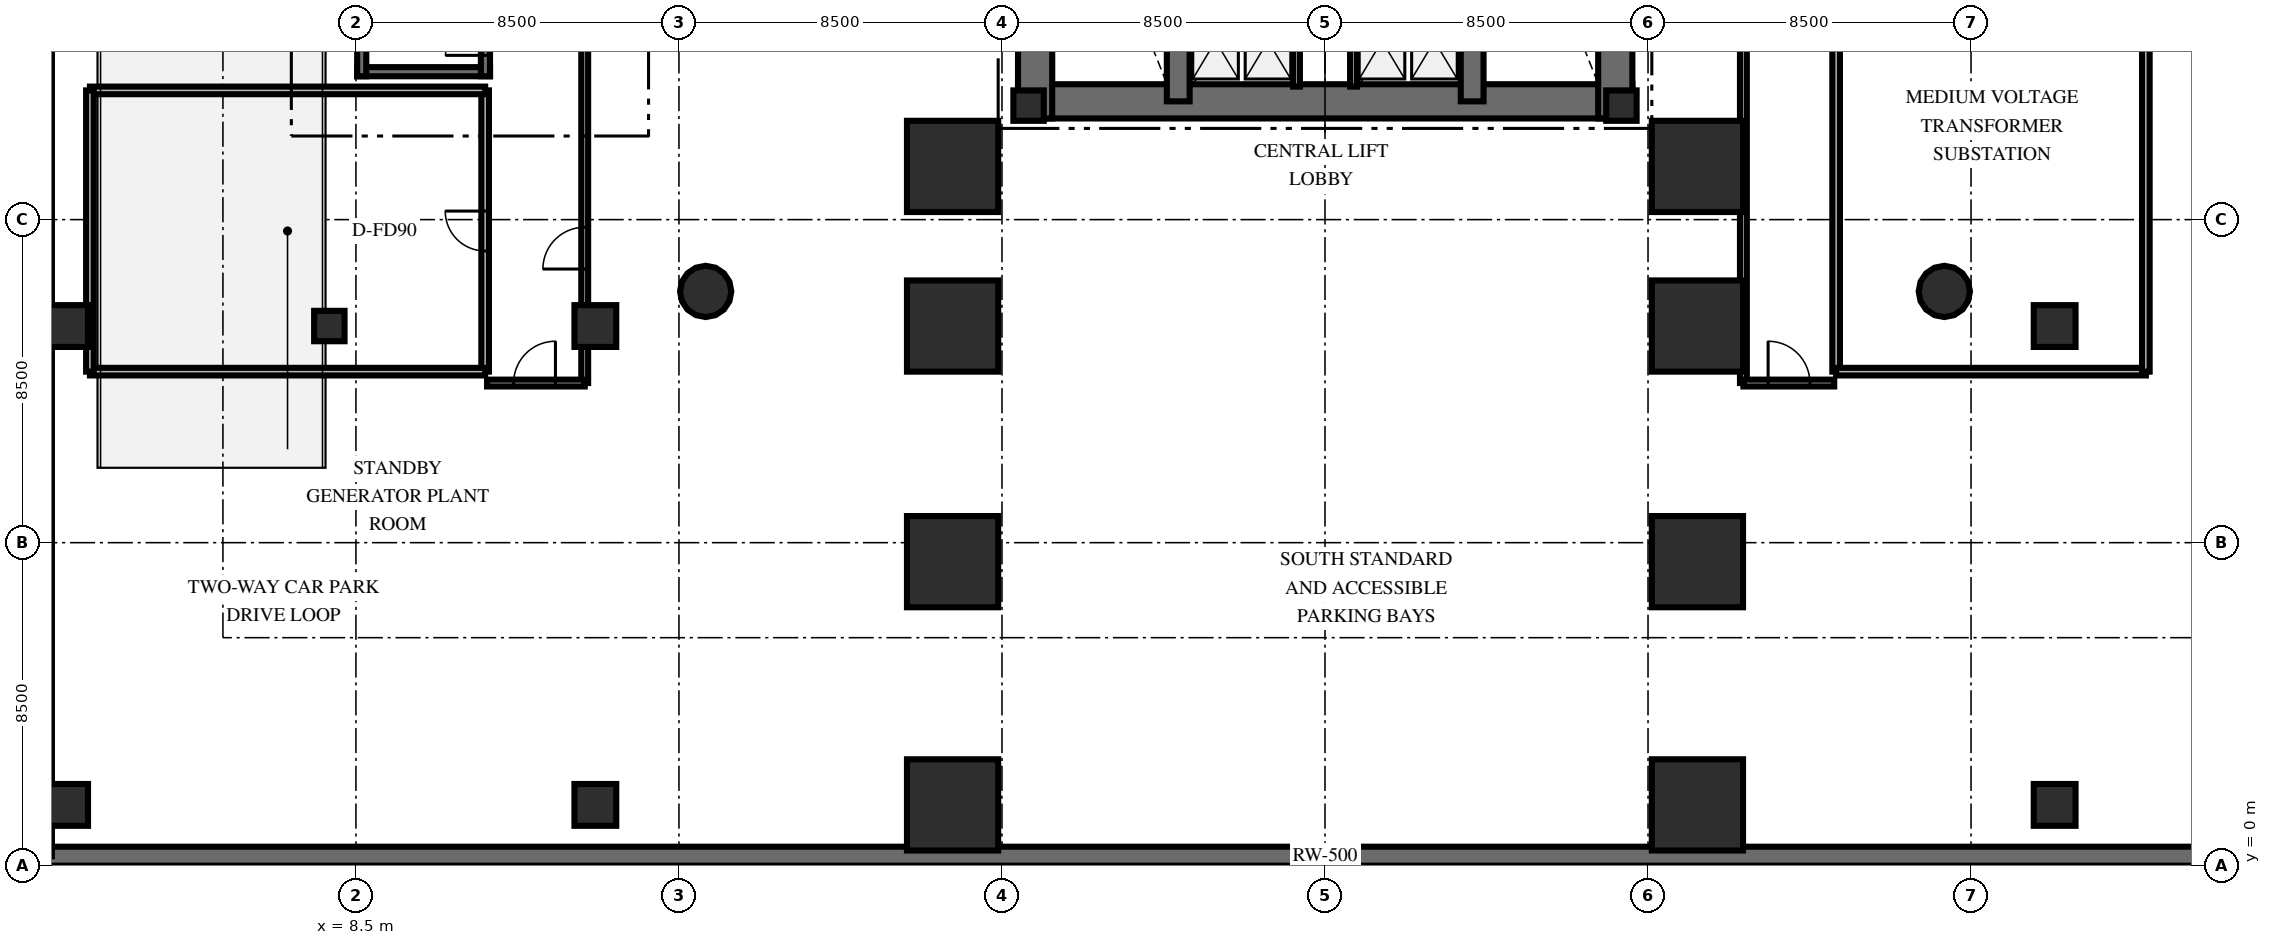
"""IFC4 building model, lengths in metres.
Left out: names, types, materials, properties, quantities, classifications, styles, units other than length and angle.
Written with IfcOpenShell. Run it as: python <this file> out.ifc"""

import sys

from ifc_helpers import new_model, si_unit, direction, frame, frame_2d, origin, origin_2d, place, context, subcontext, project, spatial, rectangle, circle, extrude, element, fill, save


model = new_model("IFC4")
c1 = context("Model", 3, precision=1e-05, world=origin(), true_north=direction((0.0, 1.0)))
c2 = subcontext(c1, "Body", "Model", "MODEL_VIEW")
j1 = project(units=[si_unit("LENGTHUNIT", "METRE"), si_unit("PLANEANGLEUNIT", "RADIAN")], contexts=[c1])
p1 = place(None, origin())
s1 = spatial("IfcSite", under=j1, at=p1, CompositionType="ELEMENT")
p2 = place(p1, origin())
s2 = spatial("IfcBuilding", under=s1, at=p2, CompositionType="ELEMENT")
p3 = place(p2, frame((0.0, 0.0, -4.8)))
s3 = spatial("IfcBuildingStorey", under=s2, at=p3, CompositionType="ELEMENT", Elevation=-4.8)
p4 = place(p3, frame((0.25, 0.25, 0.0), z_axis=(0.0, 0.0, 1.0), x_axis=(1.0, 0.0, 0.0)))
e1 = element("IfcWall", 1, at=p4, inside=s3, PredefinedType="SOLIDWALL", context=c2, shape_type="SweptSolid", body=[
    extrude(rectangle(XDim=67.5, YDim=0.5, at=frame_2d((33.75, 0.0))), origin(), (0.0, 0.0, 1.0), 4.8),
])
p5 = place(p3, frame((25.922, 20.112, 0.0), z_axis=(0.0, 0.0, 1.0), x_axis=(1.0, 0.0, 0.0)))
e2 = element("IfcWall", 2, at=p5, inside=s3, PredefinedType="SHEAR", context=c2, shape_type="SweptSolid", body=[
    extrude(rectangle(XDim=16.166, YDim=0.9, at=frame_2d((8.083, 0.0))), origin(), (0.0, 0.0, 1.0), 4.8),
])
for number, where, z_axis, x_axis in (
    (3, (26.372, 19.662, 0.0), (0.0, 0.0, 1.0), (0.0, 1.0, 0.0)),
    (4, (41.638, 19.662, 0.0), (0.0, 0.0, 1.0), (0.0, 1.0, 0.0)),
):
    element("IfcWall", number, at=place(p3, frame(where, z_axis=z_axis, x_axis=x_axis)), inside=s3, PredefinedType="SHEAR", context=c2, shape_type="SweptSolid", body=[
        extrude(rectangle(XDim=10.876, YDim=0.9, at=frame_2d((5.438, 0.0))), origin(), (0.0, 0.0, 1.0), 4.8),
    ])
for number, where, z_axis, x_axis in (
    (5, (30.138, 20.112, 0.0), (0.0, 0.0, 1.0), (0.0, 1.0, 0.0)),
    (6, (37.872, 20.112, 0.0), (0.0, 0.0, 1.0), (0.0, 1.0, 0.0)),
):
    element("IfcWall", number, at=place(p3, frame(where, z_axis=z_axis, x_axis=x_axis)), inside=s3, PredefinedType="SHEAR", context=c2, shape_type="SweptSolid", body=[
        extrude(rectangle(XDim=9.976, YDim=0.6, at=frame_2d((4.988, 0.0))), origin(), (0.0, 0.0, 1.0), 4.8),
    ])
for number, where, z_axis, x_axis in (
    (7, (26.2, 20.0, 0.0), (0.0, 0.0, 1.0), (1.0, 0.0, 0.0)),
    (8, (41.8, 20.0, 0.0), (0.0, 0.0, 1.0), (1.0, 0.0, 0.0)),
):
    element("IfcColumn", number, at=place(p3, frame(where, z_axis=z_axis, x_axis=x_axis)), inside=s3, PredefinedType="PILASTER", context=c2, shape_type="SweptSolid", body=[
        extrude(rectangle(XDim=0.8, YDim=0.8, at=origin_2d()), origin(), (0.0, 0.0, 1.0), 4.8),
    ])
p6 = place(p3, frame((8.532, 20.892, 0.0), z_axis=(0.0, 0.0, 1.0), x_axis=(1.0, 0.0, 0.0)))
e9 = element("IfcWall", 9, at=p6, inside=s3, PredefinedType="SHEAR", context=c2, shape_type="SweptSolid", body=[
    extrude(rectangle(XDim=3.496, YDim=0.24, at=frame_2d((1.748, 0.0))), origin(), (0.0, 0.0, 1.0), 4.8),
])
p7 = place(p3, frame((8.652, 20.772, 0.0), z_axis=(0.0, 0.0, 1.0), x_axis=(0.0, 1.0, 0.0)))
e10 = element("IfcWall", 10, at=p7, inside=s3, PredefinedType="SHEAR", context=c2, shape_type="SweptSolid", body=[
    extrude(rectangle(XDim=9.556, YDim=0.24, at=frame_2d((4.778, 0.0))), origin(), (0.0, 0.0, 1.0), 4.8),
])
p8 = place(p3, frame((11.908, 20.772, 0.0), z_axis=(0.0, 0.0, 1.0), x_axis=(0.0, 1.0, 0.0)))
e11 = element("IfcWall", 11, at=p8, inside=s3, PredefinedType="SHEAR", context=c2, shape_type="SweptSolid", body=[
    extrude(rectangle(XDim=9.556, YDim=0.24, at=frame_2d((4.778, 0.0))), origin(), (0.0, 0.0, 1.0), 4.8),
])
p9 = place(p8, frame((0.55, 0.0, 0.0)))
e12 = element("IfcOpeningElement", 12, at=p9, cuts=e11, PredefinedType="OPENING", context=c2, shape_type="SweptSolid", body=[
    extrude(rectangle(XDim=1.05, YDim=2.15, at=frame_2d((0.525, 1.075))), frame((0.0, 0.13, 0.0), z_axis=(0.0, -1.0, 0.0), x_axis=(1.0, 0.0, 0.0)), (0.0, 0.0, 1.0), 0.26),
])
for number, where, z_axis, x_axis in (
    (13, (24.2, 1.6, 0.0), (0.0, 0.0, 1.0), (1.0, 0.0, 0.0)),
    (14, (24.2, 8.0, 0.0), (0.0, 0.0, 1.0), (1.0, 0.0, 0.0)),
    (15, (24.2, 14.2, 0.0), (0.0, 0.0, 1.0), (1.0, 0.0, 0.0)),
    (16, (24.2, 18.4, 0.0), (0.0, 0.0, 1.0), (1.0, 0.0, 0.0)),
    (17, (43.8, 1.6, 0.0), (0.0, 0.0, 1.0), (1.0, 0.0, 0.0)),
    (18, (43.8, 8.0, 0.0), (0.0, 0.0, 1.0), (1.0, 0.0, 0.0)),
    (19, (43.8, 14.2, 0.0), (0.0, 0.0, 1.0), (1.0, 0.0, 0.0)),
    (20, (43.8, 18.4, 0.0), (0.0, 0.0, 1.0), (1.0, 0.0, 0.0)),
):
    element("IfcColumn", number, at=place(p3, frame(where, z_axis=z_axis, x_axis=x_axis)), inside=s3, PredefinedType="USERDEFINED", context=c2, shape_type="SweptSolid", body=[
        extrude(rectangle(XDim=2.4, YDim=2.4, at=origin_2d()), origin(), (0.0, 0.0, 1.0), 4.8),
    ])
for number, where, z_axis, x_axis in (
    (21, (0.9, 1.6, 0.0), (0.0, 0.0, 1.0), (1.0, 0.0, 0.0)),
    (22, (0.9, 14.2, 0.0), (0.0, 0.0, 1.0), (1.0, 0.0, 0.0)),
    (23, (14.8, 1.6, 0.0), (0.0, 0.0, 1.0), (1.0, 0.0, 0.0)),
    (24, (14.8, 14.2, 0.0), (0.0, 0.0, 1.0), (1.0, 0.0, 0.0)),
    (25, (53.2, 1.6, 0.0), (0.0, 0.0, 1.0), (1.0, 0.0, 0.0)),
    (26, (53.2, 14.2, 0.0), (0.0, 0.0, 1.0), (1.0, 0.0, 0.0)),
):
    element("IfcColumn", number, at=place(p3, frame(where, z_axis=z_axis, x_axis=x_axis)), inside=s3, PredefinedType="COLUMN", context=c2, shape_type="SweptSolid", body=[
        extrude(rectangle(XDim=1.1, YDim=1.1, at=origin_2d()), origin(), (0.0, 0.0, 1.0), 4.8),
    ])
for number, where, z_axis, x_axis in (
    (27, (17.703, 15.111, 0.0), (0.0, 0.0, 1.0), (1.0, 0.0, 0.0)),
    (28, (50.297, 15.111, 0.0), (0.0, 0.0, 1.0), (1.0, 0.0, 0.0)),
):
    element("IfcColumn", number, at=place(p3, frame(where, z_axis=z_axis, x_axis=x_axis)), inside=s3, PredefinedType="COLUMN", context=c2, shape_type="SweptSolid", body=[
        extrude(circle(Radius=0.675, at=origin_2d()), origin(), (0.0, 0.0, 1.0), 4.8),
    ])
p10 = place(p3, frame((7.8, 14.2, 0.0), z_axis=(0.0, 0.0, 1.0), x_axis=(1.0, 0.0, 0.0)))
e29 = element("IfcColumn", 29, at=p10, inside=s3, PredefinedType="COLUMN", context=c2, shape_type="SweptSolid", body=[
    extrude(rectangle(XDim=0.8, YDim=0.8, at=origin_2d()), origin(), (0.0, 0.0, 1.0), 4.8),
])
for number, where, z_axis, x_axis in (
    (30, (33.25, 20.5, 0.0), (0.0, 0.0, 1.0), (0.0, 1.0, 0.0)),
    (31, (34.75, 20.5, 0.0), (0.0, 0.0, 1.0), (0.0, 1.0, 0.0)),
):
    element("IfcWall", number, at=place(p3, frame(where, z_axis=z_axis, x_axis=x_axis)), inside=s3, PredefinedType="SOLIDWALL", context=c2, shape_type="SweptSolid", body=[
        extrude(rectangle(XDim=2.42, YDim=0.18, at=frame_2d((1.21, 0.0))), origin(), (0.0, 0.0, 1.0), 3.56),
    ])
p11 = place(p3, frame((14.52, 12.7, 0.0), z_axis=(0.0, 0.0, 1.0), x_axis=(0.0, 1.0, 0.0)))
e32 = element("IfcWall", 32, at=p11, inside=s3, PredefinedType="PARTITIONING", context=c2, shape_type="SweptSolid", body=[
    extrude(rectangle(XDim=21.73, YDim=0.18, at=frame_2d((10.865, 0.0))), origin(), (0.0, 0.0, 1.0), 3.56),
])
p12 = place(p11, frame((3.0, 0.0, 0.0)))
e33 = element("IfcOpeningElement", 33, at=p12, cuts=e32, PredefinedType="OPENING", context=c2, shape_type="SweptSolid", body=[
    extrude(rectangle(XDim=1.1, YDim=2.15, at=frame_2d((0.55, 1.075))), frame((0.0, 0.1, 0.0), z_axis=(0.0, -1.0, 0.0), x_axis=(1.0, 0.0, 0.0)), (0.0, 0.0, 1.0), 0.2),
])
p13 = place(p3, frame((11.95, 12.7, 0.0), z_axis=(0.0, 0.0, 1.0), x_axis=(1.0, 0.0, 0.0)))
e34 = element("IfcWall", 34, at=p13, inside=s3, PredefinedType="PARTITIONING", context=c2, shape_type="SweptSolid", body=[
    extrude(rectangle(XDim=2.57, YDim=0.18, at=frame_2d((1.285, 0.0))), origin(), (0.0, 0.0, 1.0), 3.56),
])
p14 = place(p13, frame((0.7, 0.0, 0.0)))
e35 = element("IfcOpeningElement", 35, at=p14, cuts=e34, PredefinedType="OPENING", context=c2, shape_type="SweptSolid", body=[
    extrude(rectangle(XDim=1.1, YDim=2.15, at=frame_2d((0.55, 1.075))), frame((0.0, 0.1, 0.0), z_axis=(0.0, -1.0, 0.0), x_axis=(1.0, 0.0, 0.0)), (0.0, 0.0, 1.0), 0.2),
])
p15 = place(p3, frame((45.01, 12.7, 0.0), z_axis=(0.0, 0.0, 1.0), x_axis=(0.0, 1.0, 0.0)))
e36 = element("IfcWall", 36, at=p15, inside=s3, PredefinedType="PARTITIONING", context=c2, shape_type="SweptSolid", body=[
    extrude(rectangle(XDim=21.73, YDim=0.18, at=frame_2d((10.865, 0.0))), origin(), (0.0, 0.0, 1.0), 3.56),
])
p16 = place(p3, frame((45.01, 12.7, 0.0), z_axis=(0.0, 0.0, 1.0), x_axis=(1.0, 0.0, 0.0)))
e37 = element("IfcWall", 37, at=p16, inside=s3, PredefinedType="PARTITIONING", context=c2, shape_type="SweptSolid", body=[
    extrude(rectangle(XDim=2.39, YDim=0.18, at=frame_2d((1.195, 0.0))), origin(), (0.0, 0.0, 1.0), 3.56),
])
p17 = place(p16, frame((0.65, 0.0, 0.0)))
e38 = element("IfcOpeningElement", 38, at=p17, cuts=e37, PredefinedType="OPENING", context=c2, shape_type="SweptSolid", body=[
    extrude(rectangle(XDim=1.1, YDim=2.15, at=frame_2d((0.55, 1.075))), frame((0.0, 0.1, 0.0), z_axis=(0.0, -1.0, 0.0), x_axis=(1.0, 0.0, 0.0)), (0.0, 0.0, 1.0), 0.2),
])
p18 = place(p3, frame((11.9, 13.0, 0.0), z_axis=(0.0, 0.0, 1.0), x_axis=(0.0, 1.0, 0.0)))
e39 = element("IfcWall", 39, at=p18, inside=s3, PredefinedType="SOLIDWALL", context=c2, shape_type="SweptSolid", body=[
    extrude(rectangle(XDim=7.4, YDim=0.2, at=frame_2d((3.7, 0.0))), origin(), (0.0, 0.0, 1.0), 3.56),
])
p19 = place(p18, frame((3.175, 0.0, 0.0)))
e40 = element("IfcOpeningElement", 40, at=p19, cuts=e39, PredefinedType="OPENING", context=c2, shape_type="SweptSolid", body=[
    extrude(rectangle(XDim=1.05, YDim=2.15, at=frame_2d((0.525, 1.075))), frame((0.0, 0.11, 0.0), z_axis=(0.0, -1.0, 0.0), x_axis=(1.0, 0.0, 0.0)), (0.0, 0.0, 1.0), 0.22),
])
for number, where, z_axis, x_axis in (
    (41, (1.5, 13.0, 0.0), (0.0, 0.0, 1.0), (1.0, 0.0, 0.0)),
    (42, (11.9, 20.4, 0.0), (0.0, 0.0, 1.0), (-1.0, 0.0, 0.0)),
):
    element("IfcWall", number, at=place(p3, frame(where, z_axis=z_axis, x_axis=x_axis)), inside=s3, PredefinedType="SOLIDWALL", context=c2, shape_type="SweptSolid", body=[
        extrude(rectangle(XDim=10.4, YDim=0.2, at=frame_2d((5.2, 0.0))), origin(), (0.0, 0.0, 1.0), 3.56),
    ])
p20 = place(p3, frame((1.5, 20.4, 0.0), z_axis=(0.0, 0.0, 1.0), x_axis=(0.0, -1.0, 0.0)))
e43 = element("IfcWall", 43, at=p20, inside=s3, PredefinedType="SOLIDWALL", context=c2, shape_type="SweptSolid", body=[
    extrude(rectangle(XDim=7.4, YDim=0.2, at=frame_2d((3.7, 0.0))), origin(), (0.0, 0.0, 1.0), 3.56),
])
p21 = place(p3, frame((47.45, 36.6, 0.0), z_axis=(0.0, 0.0, 1.0), x_axis=(0.0, -1.0, 0.0)))
e44 = element("IfcWall", 44, at=p21, inside=s3, PredefinedType="SOLIDWALL", context=c2, shape_type="SweptSolid", body=[
    extrude(rectangle(XDim=23.6, YDim=0.2, at=frame_2d((11.8, 0.0))), origin(), (0.0, 0.0, 1.0), 3.56),
])
p22 = place(p21, frame((11.275, 0.0, 0.0)))
e45 = element("IfcOpeningElement", 45, at=p22, cuts=e44, PredefinedType="OPENING", context=c2, shape_type="SweptSolid", body=[
    extrude(rectangle(XDim=1.05, YDim=2.15, at=frame_2d((0.525, 1.075))), frame((0.0, 0.11, 0.0), z_axis=(0.0, -1.0, 0.0), x_axis=(1.0, 0.0, 0.0)), (0.0, 0.0, 1.0), 0.22),
])
p23 = place(p3, frame((47.45, 13.0, 0.0), z_axis=(0.0, 0.0, 1.0), x_axis=(1.0, 0.0, 0.0)))
e46 = element("IfcWall", 46, at=p23, inside=s3, PredefinedType="SOLIDWALL", context=c2, shape_type="SweptSolid", body=[
    extrude(rectangle(XDim=8.15, YDim=0.2, at=frame_2d((4.075, 0.0))), origin(), (0.0, 0.0, 1.0), 3.56),
])
p24 = place(p3, frame((55.6, 13.0, 0.0), z_axis=(0.0, 0.0, 1.0), x_axis=(0.0, 1.0, 0.0)))
e47 = element("IfcWall", 47, at=p24, inside=s3, PredefinedType="SOLIDWALL", context=c2, shape_type="SweptSolid", body=[
    extrude(rectangle(XDim=23.6, YDim=0.2, at=frame_2d((11.8, 0.0))), origin(), (0.0, 0.0, 1.0), 3.56),
])
p25 = place(p9, origin())
e48 = element("IfcDoor", 48, at=p25, inside=s3, OperationType="SINGLE_SWING_LEFT", PredefinedType="DOOR", context=c2, shape_type="SweptSolid", body=[
    extrude(rectangle(XDim=1.05, YDim=2.15, at=frame_2d((0.525, 1.075))), frame((0.0, 0.025, 0.0), z_axis=(0.0, -1.0, 0.0), x_axis=(1.0, 0.0, 0.0)), (0.0, 0.0, 1.0), 0.05),
])
fill(e12, e48)
p26 = place(p12, origin())
e49 = element("IfcDoor", 49, at=p26, inside=s3, OperationType="SINGLE_SWING_LEFT", PredefinedType="DOOR", context=c2, shape_type="SweptSolid", body=[
    extrude(rectangle(XDim=1.1, YDim=2.15, at=frame_2d((0.55, 1.075))), frame((0.0, 0.025, 0.0), z_axis=(0.0, -1.0, 0.0), x_axis=(1.0, 0.0, 0.0)), (0.0, 0.0, 1.0), 0.05),
])
fill(e33, e49)
p27 = place(p14, origin())
e50 = element("IfcDoor", 50, at=p27, inside=s3, OperationType="SINGLE_SWING_RIGHT", PredefinedType="DOOR", context=c2, shape_type="SweptSolid", body=[
    extrude(rectangle(XDim=1.1, YDim=2.15, at=frame_2d((0.55, 1.075))), frame((0.0, 0.025, 0.0), z_axis=(0.0, -1.0, 0.0), x_axis=(1.0, 0.0, 0.0)), (0.0, 0.0, 1.0), 0.05),
])
fill(e35, e50)
p28 = place(p17, origin())
e51 = element("IfcDoor", 51, at=p28, inside=s3, OperationType="SINGLE_SWING_LEFT", PredefinedType="DOOR", context=c2, shape_type="SweptSolid", body=[
    extrude(rectangle(XDim=1.1, YDim=2.15, at=frame_2d((0.55, 1.075))), frame((0.0, 0.025, 0.0), z_axis=(0.0, -1.0, 0.0), x_axis=(1.0, 0.0, 0.0)), (0.0, 0.0, 1.0), 0.05),
])
fill(e38, e51)
p29 = place(p19, origin())
e52 = element("IfcDoor", 52, at=p29, inside=s3, OperationType="SINGLE_SWING_RIGHT", PredefinedType="DOOR", context=c2, shape_type="SweptSolid", body=[
    extrude(rectangle(XDim=1.05, YDim=2.15, at=frame_2d((0.525, 1.075))), frame((0.0, 0.025, 0.0), z_axis=(0.0, -1.0, 0.0), x_axis=(1.0, 0.0, 0.0)), (0.0, 0.0, 1.0), 0.05),
])
fill(e40, e52)
save(model, sys.argv[1])
